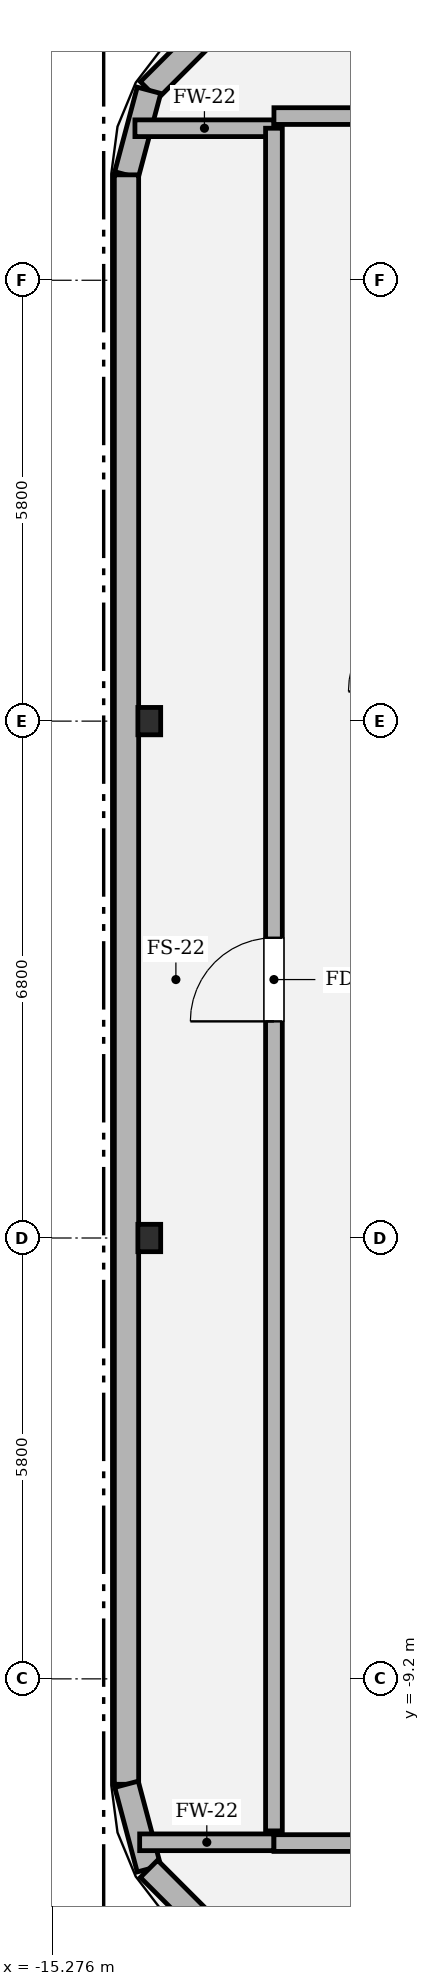
"""IFC4 building model, lengths in metres.
Left out: names, types, materials, properties, quantities, classifications, styles, units other than length and angle.
Written with IfcOpenShell. Run it as: python <this file> out.ifc"""

import sys

from ifc_helpers import new_model, si_unit, direction, frame, frame_2d, origin, origin_2d, place, context, subcontext, project, spatial, rectangle, i_section, extrude, element, fill, save


model = new_model("IFC4")
c1 = context("Model", 3, precision=1e-05, world=origin(), true_north=direction((0.0, 1.0)))
c2 = subcontext(c1, "Body", "Model", "MODEL_VIEW")
j1 = project(units=[si_unit("LENGTHUNIT", "METRE"), si_unit("PLANEANGLEUNIT", "RADIAN")], contexts=[c1])
p1 = place(None, origin())
s1 = spatial("IfcSite", under=j1, at=p1, CompositionType="ELEMENT")
p2 = place(p1, origin())
s2 = spatial("IfcBuilding", under=s1, at=p2, CompositionType="ELEMENT")
p3 = place(p2, frame((0.0, 0.0, 366.3)))
s3 = spatial("IfcBuildingStorey", under=s2, at=p3, CompositionType="ELEMENT", Elevation=366.3)
for number, where, z_axis, x_axis in (
    (1, (-14.0, -3.4, 0.0), (0.0, 0.0, 1.0), (1.0, 0.0, 0.0)),
    (2, (-14.0, 3.4, 0.0), (0.0, 0.0, 1.0), (1.0, 0.0, 0.0)),
):
    element("IfcColumn", number, at=place(p3, frame(where, z_axis=z_axis, x_axis=x_axis)), inside=s3, PredefinedType="COLUMN", context=c2, shape_type="SweptSolid", body=[
        extrude(i_section(OverallWidth=0.3, OverallDepth=0.36, WebThickness=0.012, FlangeThickness=0.022, FilletRadius=0.018, at=origin_2d()), origin(), (0.0, 0.0, 1.0), 4.498),
    ])
p4 = place(p3, frame((-13.199, 12.504, 0.0), z_axis=(0.0, 0.0, 1.0), x_axis=(-0.707106781187, -0.707106781187, 0.0)))
e3 = element("IfcWall", 3, at=p4, inside=s3, PredefinedType="SOLIDWALL", context=c2, shape_type="SweptSolid", body=[
    extrude(rectangle(XDim=1.138, YDim=0.32, at=frame_2d((0.569, 0.0))), origin(), (0.0, 0.0, 1.0), 3.924),
])
p5 = place(p3, frame((-14.004, 11.699, 0.0), z_axis=(0.0, 0.0, 1.0), x_axis=(-0.25727979053, -0.966336954372, 0.0)))
e4 = element("IfcWall", 4, at=p5, inside=s3, PredefinedType="SOLIDWALL", context=c2, shape_type="SweptSolid", body=[
    extrude(rectangle(XDim=1.151, YDim=0.32, at=frame_2d((0.576, 0.0))), origin(), (0.0, 0.0, 1.0), 3.924),
])
p6 = place(p3, frame((-14.3, 10.587, 0.0), z_axis=(0.0, 0.0, 1.0), x_axis=(0.0, -1.0, 0.0)))
e5 = element("IfcWall", 5, at=p6, inside=s3, PredefinedType="SOLIDWALL", context=c2, shape_type="SweptSolid", body=[
    extrude(rectangle(XDim=21.174, YDim=0.32, at=frame_2d((10.587, 0.0))), origin(), (0.0, 0.0, 1.0), 3.924),
])
p7 = place(p3, frame((-14.3, -10.587, 0.0), z_axis=(0.0, 0.0, 1.0), x_axis=(0.25727979053, -0.966336954372, 0.0)))
e6 = element("IfcWall", 6, at=p7, inside=s3, PredefinedType="SOLIDWALL", context=c2, shape_type="SweptSolid", body=[
    extrude(rectangle(XDim=1.151, YDim=0.32, at=frame_2d((0.576, 0.0))), origin(), (0.0, 0.0, 1.0), 3.924),
])
p8 = place(p3, frame((-14.004, -11.699, 0.0), z_axis=(0.0, 0.0, 1.0), x_axis=(0.707106781187, -0.707106781187, 0.0)))
e7 = element("IfcWall", 7, at=p8, inside=s3, PredefinedType="SOLIDWALL", context=c2, shape_type="SweptSolid", body=[
    extrude(rectangle(XDim=1.138, YDim=0.32, at=frame_2d((0.569, 0.0))), origin(), (0.0, 0.0, 1.0), 3.924),
])
p9 = place(p3, frame((-14.127, -11.35, 0.0), z_axis=(0.0, 0.0, 1.0), x_axis=(1.0, 0.0, 0.0)))
e8 = element("IfcWall", 8, at=p9, inside=s3, PredefinedType="SOLIDWALL", context=c2, shape_type="SweptSolid", body=[
    extrude(rectangle(XDim=1.767, YDim=0.22, at=frame_2d((0.883, 0.0))), origin(), (0.0, 0.0, 1.0), 3.924),
])
p10 = place(p3, frame((-12.36, -11.36, 0.0), z_axis=(0.0, 0.0, 1.0), x_axis=(1.0, 0.0, 0.0)))
e9 = element("IfcWall", 9, at=p10, inside=s3, PredefinedType="SOLIDWALL", context=c2, shape_type="SweptSolid", body=[
    extrude(rectangle(XDim=24.72, YDim=0.22, at=frame_2d((12.36, 0.0))), origin(), (0.0, 0.0, 1.0), 3.924),
])
p11 = place(p10, frame((16.76, 0.0, 0.0)))
e10 = element("IfcOpeningElement", 10, at=p11, cuts=e9, PredefinedType="OPENING", context=c2, shape_type="SweptSolid", body=[
    extrude(rectangle(XDim=1.1, YDim=2.2, at=frame_2d((0.55, 1.1))), frame((0.0, 0.12, 0.0), z_axis=(0.0, -1.0, 0.0), x_axis=(1.0, 0.0, 0.0)), (0.0, 0.0, 1.0), 0.24),
])
p12 = place(p3, frame((-14.189, 11.2, 0.0), z_axis=(0.0, 0.0, 1.0), x_axis=(1.0, 0.0, 0.0)))
e11 = element("IfcWall", 11, at=p12, inside=s3, PredefinedType="SOLIDWALL", context=c2, shape_type="SweptSolid", body=[
    extrude(rectangle(XDim=1.829, YDim=0.22, at=frame_2d((0.915, 0.0))), origin(), (0.0, 0.0, 1.0), 3.924),
])
p13 = place(p3, frame((-12.36, 11.2, 0.0), z_axis=(0.0, 0.0, 1.0), x_axis=(0.0, -1.0, 0.0)))
e12 = element("IfcWall", 12, at=p13, inside=s3, PredefinedType="SOLIDWALL", context=c2, shape_type="SweptSolid", body=[
    extrude(rectangle(XDim=22.4, YDim=0.22, at=frame_2d((11.2, 0.0))), origin(), (0.0, 0.0, 1.0), 3.924),
])
p14 = place(p13, frame((10.65, 0.0, 0.0)))
e13 = element("IfcOpeningElement", 13, at=p14, cuts=e12, PredefinedType="OPENING", context=c2, shape_type="SweptSolid", body=[
    extrude(rectangle(XDim=1.1, YDim=2.2, at=frame_2d((0.55, 1.1))), frame((0.0, 0.12, 0.0), z_axis=(0.0, -1.0, 0.0), x_axis=(1.0, 0.0, 0.0)), (0.0, 0.0, 1.0), 0.24),
])
p15 = place(p3, frame((12.36, 11.36, 0.0), z_axis=(0.0, 0.0, 1.0), x_axis=(-1.0, 0.0, 0.0)))
e14 = element("IfcWall", 14, at=p15, inside=s3, PredefinedType="SOLIDWALL", context=c2, shape_type="SweptSolid", body=[
    extrude(rectangle(XDim=24.72, YDim=0.22, at=frame_2d((12.36, 0.0))), origin(), (0.0, 0.0, 1.0), 3.924),
])
p16 = place(p15, frame((16.76, 0.0, 0.0)))
e15 = element("IfcOpeningElement", 15, at=p16, cuts=e14, PredefinedType="OPENING", context=c2, shape_type="SweptSolid", body=[
    extrude(rectangle(XDim=1.1, YDim=2.2, at=frame_2d((0.55, 1.1))), frame((0.0, 0.12, 0.0), z_axis=(0.0, -1.0, 0.0), x_axis=(1.0, 0.0, 0.0)), (0.0, 0.0, 1.0), 0.24),
])
p17 = place(p14, origin())
e16 = element("IfcDoor", 16, at=p17, inside=s3, OperationType="SINGLE_SWING_RIGHT", PredefinedType="DOOR", context=c2, shape_type="SweptSolid", body=[
    extrude(rectangle(XDim=1.1, YDim=2.2, at=frame_2d((0.55, 1.1))), frame((0.0, 0.025, 0.0), z_axis=(0.0, -1.0, 0.0), x_axis=(1.0, 0.0, 0.0)), (0.0, 0.0, 1.0), 0.05),
])
fill(e13, e16)
save(model, sys.argv[1])
